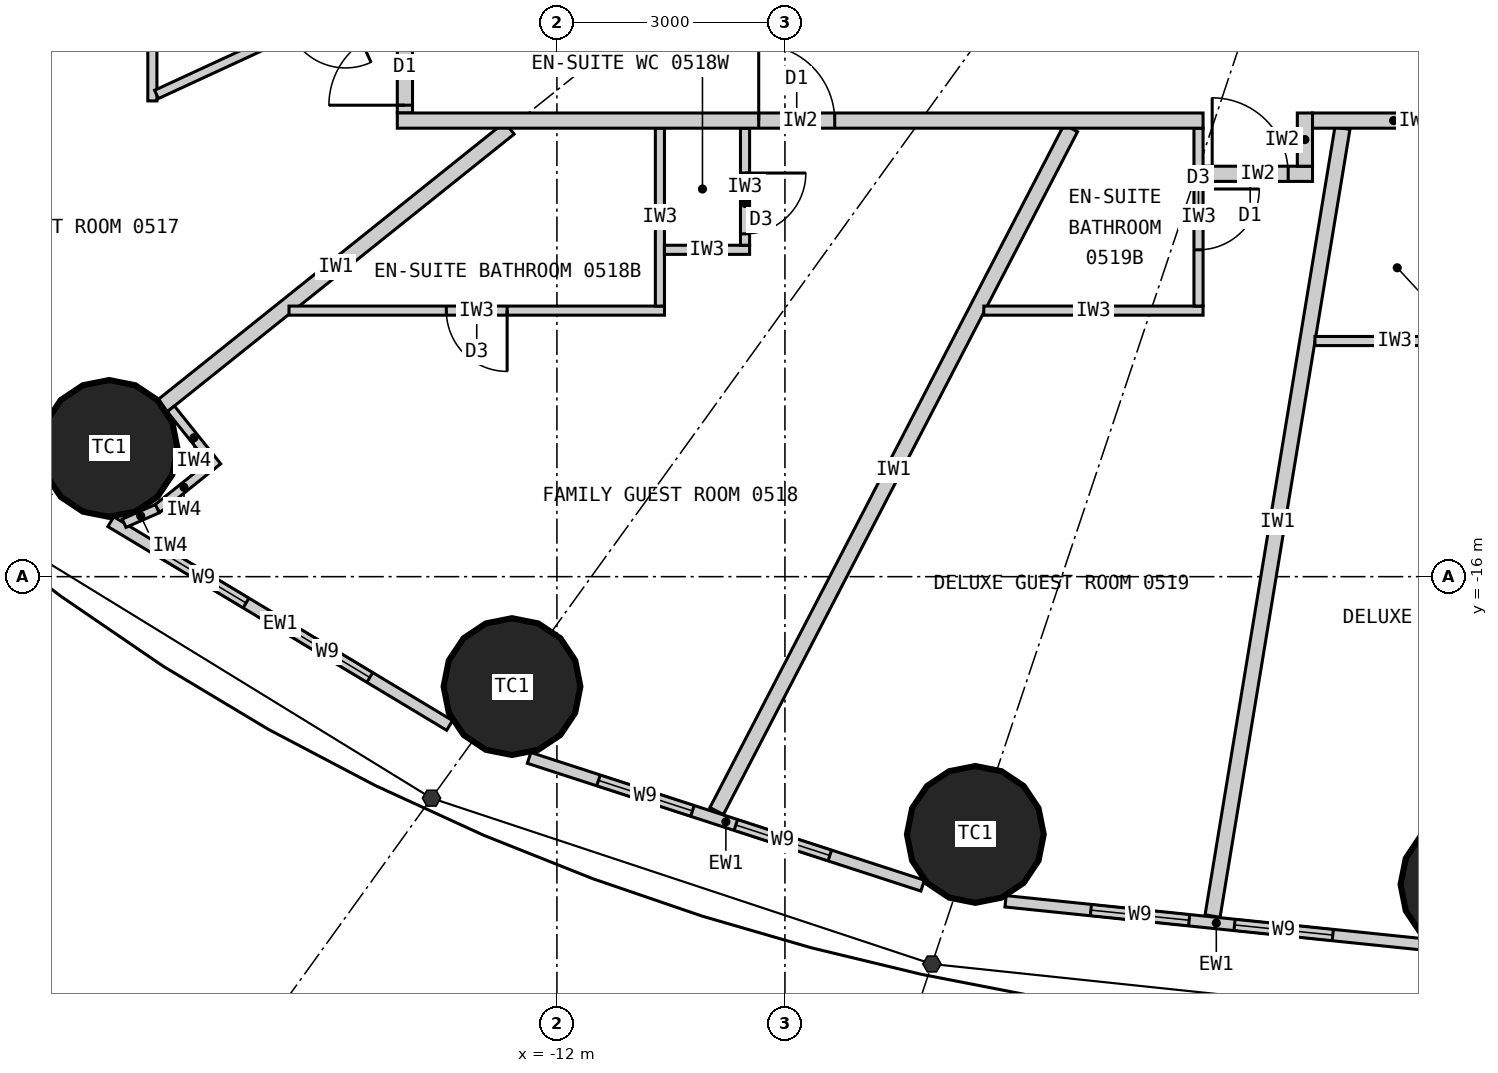
"""IFC4 building model, lengths in metres.
Left out: names, types, materials, properties, quantities, classifications, styles, units other than length and angle.
Written with IfcOpenShell. Run it as: python <this file> out.ifc"""

import sys

from ifc_helpers import new_model, si_unit, direction, frame, frame_2d, origin, origin_2d, place, context, subcontext, project, spatial, rectangle, circle, extrude, element, fill, save


model = new_model("IFC4")
c1 = context("Model", 3, precision=1e-05, world=origin(), true_north=direction((0.0, 1.0)))
c2 = subcontext(c1, "Body", "Model", "MODEL_VIEW")
j1 = project(units=[si_unit("LENGTHUNIT", "METRE"), si_unit("PLANEANGLEUNIT", "RADIAN")], contexts=[c1])
p1 = place(None, origin())
s1 = spatial("IfcSite", under=j1, at=p1, CompositionType="ELEMENT")
p2 = place(p1, origin())
s2 = spatial("IfcBuilding", under=s1, at=p2, CompositionType="ELEMENT")
p3 = place(p2, frame((0.0, 0.0, 29.4)))
s3 = spatial("IfcBuildingStorey", under=s2, at=p3, CompositionType="ELEMENT", Elevation=29.4)
for number, where, z_axis, x_axis in (
    (1, (-17.892, -14.313, 0.0), (0.0, 0.0, 1.0), (1.0, 0.0, 0.0)),
    (2, (-12.591, -17.447, 0.0), (0.0, 0.0, 1.0), (1.0, 0.0, 0.0)),
    (3, (-6.495, -19.391, 0.0), (0.0, 0.0, 1.0), (1.0, 0.0, 0.0)),
    (4, (0.0, -20.05, 0.0), (0.0, 0.0, 1.0), (1.0, 0.0, 0.0)),
):
    element("IfcColumn", number, at=place(p3, frame(where, z_axis=z_axis, x_axis=x_axis)), inside=s3, PredefinedType="COLUMN", context=c2, shape_type="SweptSolid", body=[
        extrude(circle(Radius=0.9, at=origin_2d()), origin(), (0.0, 0.0, 1.0), 3.3),
    ])
p4 = place(p3, frame((-17.869, -15.277, 0.0), z_axis=(0.0, 0.0, 1.0), x_axis=(0.856958191554, -0.515385931054, 0.0)))
e5 = element("IfcWall", 5, at=p4, inside=s3, PredefinedType="ELEMENTEDWALL", context=c2, shape_type="SweptSolid", body=[
    extrude(rectangle(XDim=5.201, YDim=0.15, at=frame_2d((2.601, 0.0))), origin(), (0.0, 0.0, 1.0), 3.12),
])
p5 = place(p4, frame((0.776, 0.0, 0.9)))
e6 = element("IfcOpeningElement", 6, at=p5, cuts=e5, PredefinedType="OPENING", context=c2, shape_type="SweptSolid", body=[
    extrude(rectangle(XDim=1.3, YDim=1.9, at=frame_2d((0.65, 0.95))), frame((0.0, 0.085, 0.0), z_axis=(0.0, -1.0, 0.0), x_axis=(1.0, 0.0, 0.0)), (0.0, 0.0, 1.0), 0.17),
])
p6 = place(p4, frame((2.676, 0.0, 0.9)))
e7 = element("IfcOpeningElement", 7, at=p6, cuts=e5, PredefinedType="OPENING", context=c2, shape_type="SweptSolid", body=[
    extrude(rectangle(XDim=1.3, YDim=1.9, at=frame_2d((0.65, 0.95))), frame((0.0, 0.085, 0.0), z_axis=(0.0, -1.0, 0.0), x_axis=(1.0, 0.0, 0.0)), (0.0, 0.0, 1.0), 0.17),
])
p7 = place(p3, frame((-12.366, -18.384, 0.0), z_axis=(0.0, 0.0, 1.0), x_axis=(0.951138486029, -0.308764603532, 0.0)))
e8 = element("IfcWall", 8, at=p7, inside=s3, PredefinedType="ELEMENTEDWALL", context=c2, shape_type="SweptSolid", body=[
    extrude(rectangle(XDim=5.444, YDim=0.15, at=frame_2d((2.722, 0.0))), origin(), (0.0, 0.0, 1.0), 3.12),
])
p8 = place(p7, frame((0.96, 0.0, 0.9)))
e9 = element("IfcOpeningElement", 9, at=p8, cuts=e8, PredefinedType="OPENING", context=c2, shape_type="SweptSolid", body=[
    extrude(rectangle(XDim=1.3, YDim=1.9, at=frame_2d((0.65, 0.95))), frame((0.0, 0.085, 0.0), z_axis=(0.0, -1.0, 0.0), x_axis=(1.0, 0.0, 0.0)), (0.0, 0.0, 1.0), 0.17),
])
p9 = place(p7, frame((2.86, 0.0, 0.9)))
e10 = element("IfcOpeningElement", 10, at=p9, cuts=e8, PredefinedType="OPENING", context=c2, shape_type="SweptSolid", body=[
    extrude(rectangle(XDim=1.3, YDim=1.9, at=frame_2d((0.65, 0.95))), frame((0.0, 0.085, 0.0), z_axis=(0.0, -1.0, 0.0), x_axis=(1.0, 0.0, 0.0)), (0.0, 0.0, 1.0), 0.17),
])
p10 = place(p3, frame((-6.098, -20.271, 0.0), z_axis=(0.0, 0.0, 1.0), x_axis=(0.994723735084, -0.102589915983, 0.0)))
e11 = element("IfcWall", 11, at=p10, inside=s3, PredefinedType="ELEMENTEDWALL", context=c2, shape_type="SweptSolid", body=[
    extrude(rectangle(XDim=5.576, YDim=0.15, at=frame_2d((2.788, 0.0))), origin(), (0.0, 0.0, 1.0), 3.12),
])
p11 = place(p10, frame((1.129, 0.0, 0.9)))
e12 = element("IfcOpeningElement", 12, at=p11, cuts=e11, PredefinedType="OPENING", context=c2, shape_type="SweptSolid", body=[
    extrude(rectangle(XDim=1.3, YDim=1.9, at=frame_2d((0.65, 0.95))), frame((0.0, 0.085, 0.0), z_axis=(0.0, -1.0, 0.0), x_axis=(1.0, 0.0, 0.0)), (0.0, 0.0, 1.0), 0.17),
])
p12 = place(p10, frame((3.029, 0.0, 0.9)))
e13 = element("IfcOpeningElement", 13, at=p12, cuts=e11, PredefinedType="OPENING", context=c2, shape_type="SweptSolid", body=[
    extrude(rectangle(XDim=1.3, YDim=1.9, at=frame_2d((0.65, 0.95))), frame((0.0, 0.085, 0.0), z_axis=(0.0, -1.0, 0.0), x_axis=(1.0, 0.0, 0.0)), (0.0, 0.0, 1.0), 0.17),
])
p13 = place(p3, frame((-14.1, -6.512, 0.0), z_axis=(0.0, 0.0, 1.0), x_axis=(-0.907842433118, -0.41931147925, 0.0)))
e14 = element("IfcWall", 14, at=p13, inside=s3, PredefinedType="PARTITIONING", context=c2, shape_type="SweptSolid", body=[
    extrude(rectangle(XDim=7.823, YDim=0.2, at=frame_2d((3.912, 0.0))), origin(), (0.0, 0.0, 1.0), 2.32),
])
p14 = place(p3, frame((-12.625, -10.1, 0.0), z_axis=(0.0, 0.0, 1.0), x_axis=(-0.780872884676, -0.624689953479, 0.0)))
e15 = element("IfcWall", 15, at=p14, inside=s3, PredefinedType="PARTITIONING", context=c2, shape_type="SweptSolid", body=[
    extrude(rectangle(XDim=5.845, YDim=0.2, at=frame_2d((2.922, 0.0))), origin(), (0.0, 0.0, 1.0), 2.32),
])
p15 = place(p3, frame((-5.239, -10.1, 0.0), z_axis=(0.0, 0.0, 1.0), x_axis=(-0.460422783389, -0.887699758103, 0.0)))
e16 = element("IfcWall", 16, at=p15, inside=s3, PredefinedType="PARTITIONING", context=c2, shape_type="SweptSolid", body=[
    extrude(rectangle(XDim=10.12, YDim=0.2, at=frame_2d((5.06, 0.0))), origin(), (0.0, 0.0, 1.0), 3.12),
])
p16 = place(p3, frame((-1.665, -10.1, 0.0), z_axis=(0.0, 0.0, 1.0), x_axis=(-0.162657606458, -0.986682574621, 0.0)))
e17 = element("IfcWall", 17, at=p16, inside=s3, PredefinedType="PARTITIONING", context=c2, shape_type="SweptSolid", body=[
    extrude(rectangle(XDim=10.505, YDim=0.2, at=frame_2d((5.252, 0.0))), origin(), (0.0, 0.0, 1.0), 3.12),
])
p17 = place(p3, frame((-17.323, -8.101, 0.0), z_axis=(0.0, 0.0, 1.0), x_axis=(0.0, -1.0, 0.0)))
e18 = element("IfcWall", 18, at=p17, inside=s3, PredefinedType="PARTITIONING", context=c2, shape_type="SweptSolid", body=[
    extrude(rectangle(XDim=1.64, YDim=0.12, at=frame_2d((0.82, 0.0))), origin(), (0.0, 0.0, 1.0), 3.12),
])
p18 = place(p3, frame((-14.1, -8.193, 0.0), z_axis=(0.0, 0.0, 1.0), x_axis=(-0.907836493557, -0.419324338628, 0.0)))
e19 = element("IfcWall", 19, at=p18, inside=s3, PredefinedType="PARTITIONING", context=c2, shape_type="SweptSolid", body=[
    extrude(rectangle(XDim=3.49, YDim=0.12, at=frame_2d((1.745, 0.0))), origin(), (0.0, 0.0, 1.0), 3.12),
])
p19 = place(p18, frame((0.75, 0.0, 0.0)))
e20 = element("IfcOpeningElement", 20, at=p19, cuts=e19, PredefinedType="OPENING", context=c2, shape_type="SweptSolid", body=[
    extrude(rectangle(XDim=0.8, YDim=2.1, at=frame_2d((0.4, 1.05))), frame((0.0, 0.07, 0.0), z_axis=(0.0, -1.0, 0.0), x_axis=(1.0, 0.0, 0.0)), (0.0, 0.0, 1.0), 0.14),
])
p20 = place(p3, frame((-15.525, -12.5, 0.0), z_axis=(0.0, 0.0, 1.0), x_axis=(1.0, 0.0, 0.0)))
e21 = element("IfcWall", 21, at=p20, inside=s3, PredefinedType="PARTITIONING", context=c2, shape_type="SweptSolid", body=[
    extrude(rectangle(XDim=4.94, YDim=0.12, at=frame_2d((2.47, 0.0))), origin(), (0.0, 0.0, 1.0), 3.12),
])
p21 = place(p20, frame((2.07, 0.0, 0.0)))
e22 = element("IfcOpeningElement", 22, at=p21, cuts=e21, PredefinedType="OPENING", context=c2, shape_type="SweptSolid", body=[
    extrude(rectangle(XDim=0.8, YDim=2.1, at=frame_2d((0.4, 1.05))), frame((0.0, 0.07, 0.0), z_axis=(0.0, -1.0, 0.0), x_axis=(1.0, 0.0, 0.0)), (0.0, 0.0, 1.0), 0.14),
])
p22 = place(p3, frame((-10.645, -10.1, 0.0), z_axis=(0.0, 0.0, 1.0), x_axis=(0.0, -1.0, 0.0)))
e23 = element("IfcWall", 23, at=p22, inside=s3, PredefinedType="PARTITIONING", context=c2, shape_type="SweptSolid", body=[
    extrude(rectangle(XDim=2.34, YDim=0.12, at=frame_2d((1.17, 0.0))), origin(), (0.0, 0.0, 1.0), 3.12),
])
p23 = place(p3, frame((-10.585, -11.7, 0.0), z_axis=(0.0, 0.0, 1.0), x_axis=(1.0, 0.0, 0.0)))
e24 = element("IfcWall", 24, at=p23, inside=s3, PredefinedType="PARTITIONING", context=c2, shape_type="SweptSolid", body=[
    extrude(rectangle(XDim=1.12, YDim=0.12, at=frame_2d((0.56, 0.0))), origin(), (0.0, 0.0, 1.0), 3.12),
])
p24 = place(p3, frame((-9.525, -10.1, 0.0), z_axis=(0.0, 0.0, 1.0), x_axis=(0.0, -1.0, 0.0)))
e25 = element("IfcWall", 25, at=p24, inside=s3, PredefinedType="PARTITIONING", context=c2, shape_type="SweptSolid", body=[
    extrude(rectangle(XDim=1.54, YDim=0.12, at=frame_2d((0.77, 0.0))), origin(), (0.0, 0.0, 1.0), 3.12),
])
p25 = place(p24, frame((0.59, 0.0, 0.0)))
e26 = element("IfcOpeningElement", 26, at=p25, cuts=e25, PredefinedType="OPENING", context=c2, shape_type="SweptSolid", body=[
    extrude(rectangle(XDim=0.8, YDim=2.1, at=frame_2d((0.4, 1.05))), frame((0.0, 0.07, 0.0), z_axis=(0.0, -1.0, 0.0), x_axis=(1.0, 0.0, 0.0)), (0.0, 0.0, 1.0), 0.14),
])
p26 = place(p3, frame((-6.383, -12.5, 0.0), z_axis=(0.0, 0.0, 1.0), x_axis=(1.0, 0.0, 0.0)))
e27 = element("IfcWall", 27, at=p26, inside=s3, PredefinedType="PARTITIONING", context=c2, shape_type="SweptSolid", body=[
    extrude(rectangle(XDim=2.885, YDim=0.12, at=frame_2d((1.442, 0.0))), origin(), (0.0, 0.0, 1.0), 3.12),
])
p27 = place(p3, frame((-3.559, -10.1, 0.0), z_axis=(0.0, 0.0, 1.0), x_axis=(0.0, -1.0, 0.0)))
e28 = element("IfcWall", 28, at=p27, inside=s3, PredefinedType="PARTITIONING", context=c2, shape_type="SweptSolid", body=[
    extrude(rectangle(XDim=2.34, YDim=0.12, at=frame_2d((1.17, 0.0))), origin(), (0.0, 0.0, 1.0), 3.12),
])
p28 = place(p27, frame((0.8, 0.0, 0.0)))
e29 = element("IfcOpeningElement", 29, at=p28, cuts=e28, PredefinedType="OPENING", context=c2, shape_type="SweptSolid", body=[
    extrude(rectangle(XDim=0.8, YDim=2.1, at=frame_2d((0.4, 1.05))), frame((0.0, 0.07, 0.0), z_axis=(0.0, -1.0, 0.0), x_axis=(1.0, 0.0, 0.0)), (0.0, 0.0, 1.0), 0.14),
])
p29 = place(p3, frame((-2.027, -12.9, 0.0), z_axis=(0.0, 0.0, 1.0), x_axis=(1.0, 0.0, 0.0)))
e30 = element("IfcWall", 30, at=p29, inside=s3, PredefinedType="PARTITIONING", context=c2, shape_type="SweptSolid", body=[
    extrude(rectangle(XDim=2.102, YDim=0.12, at=frame_2d((1.051, 0.0))), origin(), (0.0, 0.0, 1.0), 3.12),
])
p30 = place(p3, frame((-2.059, -10.7, 0.0), z_axis=(0.0, 0.0, 1.0), x_axis=(-1.0, 0.0, 0.0)))
e31 = element("IfcWall", 31, at=p30, inside=s3, PredefinedType="PARTITIONING", context=c2, shape_type="SweptSolid", body=[
    extrude(rectangle(XDim=1.44, YDim=0.2, at=frame_2d((0.72, 0.0))), origin(), (0.0, 0.0, 1.0), 3.12),
])
p31 = place(p30, frame((0.32, 0.0, 0.0)))
e32 = element("IfcOpeningElement", 32, at=p31, cuts=e31, PredefinedType="OPENING", context=c2, shape_type="SweptSolid", body=[
    extrude(rectangle(XDim=1.0, YDim=2.2, at=frame_2d((0.5, 1.1))), frame((0.0, 0.11, 0.0), z_axis=(0.0, -1.0, 0.0), x_axis=(1.0, 0.0, 0.0)), (0.0, 0.0, 1.0), 0.22),
])
p32 = place(p3, frame((-2.159, -9.9, 0.0), z_axis=(0.0, 0.0, 1.0), x_axis=(0.0, -1.0, 0.0)))
e33 = element("IfcWall", 33, at=p32, inside=s3, PredefinedType="PARTITIONING", context=c2, shape_type="SweptSolid", body=[
    extrude(rectangle(XDim=0.7, YDim=0.2, at=frame_2d((0.35, 0.0))), origin(), (0.0, 0.0, 1.0), 3.12),
])
p33 = place(p3, frame((-14.0, -4.772, 0.0), z_axis=(0.0, 0.0, 1.0), x_axis=(0.0, -1.0, 0.0)))
e34 = element("IfcWall", 34, at=p33, inside=s3, PredefinedType="PARTITIONING", context=c2, shape_type="SweptSolid", body=[
    extrude(rectangle(XDim=5.127, YDim=0.2, at=frame_2d((2.564, 0.0))), origin(), (0.0, 0.0, 1.0), 3.12),
])
p34 = place(p33, frame((4.025, 0.0, 0.0)))
e35 = element("IfcOpeningElement", 35, at=p34, cuts=e34, PredefinedType="OPENING", context=c2, shape_type="SweptSolid", body=[
    extrude(rectangle(XDim=1.0, YDim=2.2, at=frame_2d((0.5, 1.1))), frame((0.0, 0.11, 0.0), z_axis=(0.0, -1.0, 0.0), x_axis=(1.0, 0.0, 0.0)), (0.0, 0.0, 1.0), 0.22),
])
p35 = place(p3, frame((0.075, -10.0, 0.0), z_axis=(0.0, 0.0, 1.0), x_axis=(-1.0, 0.0, 0.0)))
e36 = element("IfcWall", 36, at=p35, inside=s3, PredefinedType="PARTITIONING", context=c2, shape_type="SweptSolid", body=[
    extrude(rectangle(XDim=2.134, YDim=0.2, at=frame_2d((1.067, 0.0))), origin(), (0.0, 0.0, 1.0), 3.12),
])
p36 = place(p3, frame((-3.499, -10.0, 0.0), z_axis=(0.0, 0.0, 1.0), x_axis=(-1.0, 0.0, 0.0)))
e37 = element("IfcWall", 37, at=p36, inside=s3, PredefinedType="PARTITIONING", context=c2, shape_type="SweptSolid", body=[
    extrude(rectangle(XDim=10.602, YDim=0.2, at=frame_2d((5.301, 0.0))), origin(), (0.0, 0.0, 1.0), 3.12),
])
p37 = place(p36, frame((4.846, 0.0, 0.0)))
e38 = element("IfcOpeningElement", 38, at=p37, cuts=e37, PredefinedType="OPENING", context=c2, shape_type="SweptSolid", body=[
    extrude(rectangle(XDim=1.0, YDim=2.2, at=frame_2d((0.5, 1.1))), frame((0.0, 0.11, 0.0), z_axis=(0.0, -1.0, 0.0), x_axis=(1.0, 0.0, 0.0)), (0.0, 0.0, 1.0), 0.22),
])
p38 = place(p3, frame((-17.08, -13.792, 0.0), z_axis=(0.0, 0.0, 1.0), x_axis=(0.624756144097, -0.780819928289, 0.0)))
e39 = element("IfcWall", 39, at=p38, inside=s3, PredefinedType="PARTITIONING", context=c2, shape_type="SweptSolid", body=[
    extrude(rectangle(XDim=0.975, YDim=0.12, at=frame_2d((0.487, 0.0))), origin(), (0.0, 0.0, 1.0), 3.12),
])
p39 = place(p3, frame((-16.555, -14.543, 0.0), z_axis=(0.0, 0.0, 1.0), x_axis=(-0.780789399477, -0.62479429708, 0.0)))
e40 = element("IfcWall", 40, at=p39, inside=s3, PredefinedType="PARTITIONING", context=c2, shape_type="SweptSolid", body=[
    extrude(rectangle(XDim=0.9, YDim=0.12, at=frame_2d((0.45, 0.0))), origin(), (0.0, 0.0, 1.0), 3.12),
])
p40 = place(p3, frame((-17.258, -15.106, 0.0), z_axis=(0.0, 0.0, 1.0), x_axis=(-0.916098562583, -0.400953143937, 0.0)))
e41 = element("IfcWall", 41, at=p40, inside=s3, PredefinedType="PARTITIONING", context=c2, shape_type="SweptSolid", body=[
    extrude(rectangle(XDim=0.477, YDim=0.12, at=frame_2d((0.238, 0.0))), origin(), (0.0, 0.0, 1.0), 3.12),
])
p41 = place(p5, origin())
e42 = element("IfcWindow", 42, at=p41, inside=s3, PartitioningType="SINGLE_PANEL", PredefinedType="WINDOW", context=c2, shape_type="SweptSolid", body=[
    extrude(rectangle(XDim=1.3, YDim=1.9, at=frame_2d((0.65, 0.95))), frame((0.0, 0.03, 0.0), z_axis=(0.0, -1.0, 0.0), x_axis=(1.0, 0.0, 0.0)), (0.0, 0.0, 1.0), 0.06),
])
fill(e6, e42)
p42 = place(p6, origin())
e43 = element("IfcWindow", 43, at=p42, inside=s3, PartitioningType="SINGLE_PANEL", PredefinedType="WINDOW", context=c2, shape_type="SweptSolid", body=[
    extrude(rectangle(XDim=1.3, YDim=1.9, at=frame_2d((0.65, 0.95))), frame((0.0, 0.03, 0.0), z_axis=(0.0, -1.0, 0.0), x_axis=(1.0, 0.0, 0.0)), (0.0, 0.0, 1.0), 0.06),
])
fill(e7, e43)
p43 = place(p8, origin())
e44 = element("IfcWindow", 44, at=p43, inside=s3, PartitioningType="SINGLE_PANEL", PredefinedType="WINDOW", context=c2, shape_type="SweptSolid", body=[
    extrude(rectangle(XDim=1.3, YDim=1.9, at=frame_2d((0.65, 0.95))), frame((0.0, 0.03, 0.0), z_axis=(0.0, -1.0, 0.0), x_axis=(1.0, 0.0, 0.0)), (0.0, 0.0, 1.0), 0.06),
])
fill(e9, e44)
p44 = place(p9, origin())
e45 = element("IfcWindow", 45, at=p44, inside=s3, PartitioningType="SINGLE_PANEL", PredefinedType="WINDOW", context=c2, shape_type="SweptSolid", body=[
    extrude(rectangle(XDim=1.3, YDim=1.9, at=frame_2d((0.65, 0.95))), frame((0.0, 0.03, 0.0), z_axis=(0.0, -1.0, 0.0), x_axis=(1.0, 0.0, 0.0)), (0.0, 0.0, 1.0), 0.06),
])
fill(e10, e45)
p45 = place(p11, origin())
e46 = element("IfcWindow", 46, at=p45, inside=s3, PartitioningType="SINGLE_PANEL", PredefinedType="WINDOW", context=c2, shape_type="SweptSolid", body=[
    extrude(rectangle(XDim=1.3, YDim=1.9, at=frame_2d((0.65, 0.95))), frame((0.0, 0.03, 0.0), z_axis=(0.0, -1.0, 0.0), x_axis=(1.0, 0.0, 0.0)), (0.0, 0.0, 1.0), 0.06),
])
fill(e12, e46)
p46 = place(p12, origin())
e47 = element("IfcWindow", 47, at=p46, inside=s3, PartitioningType="SINGLE_PANEL", PredefinedType="WINDOW", context=c2, shape_type="SweptSolid", body=[
    extrude(rectangle(XDim=1.3, YDim=1.9, at=frame_2d((0.65, 0.95))), frame((0.0, 0.03, 0.0), z_axis=(0.0, -1.0, 0.0), x_axis=(1.0, 0.0, 0.0)), (0.0, 0.0, 1.0), 0.06),
])
fill(e13, e47)
p47 = place(p34, origin())
e48 = element("IfcDoor", 48, at=p47, inside=s3, OperationType="SINGLE_SWING_RIGHT", PredefinedType="DOOR", context=c2, shape_type="SweptSolid", body=[
    extrude(rectangle(XDim=1.0, YDim=2.2, at=frame_2d((0.5, 1.1))), frame((0.0, 0.025, 0.0), z_axis=(0.0, -1.0, 0.0), x_axis=(1.0, 0.0, 0.0)), (0.0, 0.0, 1.0), 0.05),
])
fill(e35, e48)
p48 = place(p21, origin())
e49 = element("IfcDoor", 49, at=p48, inside=s3, OperationType="SINGLE_SWING_RIGHT", PredefinedType="DOOR", context=c2, shape_type="SweptSolid", body=[
    extrude(rectangle(XDim=0.8, YDim=2.1, at=frame_2d((0.4, 1.05))), frame((0.0, 0.025, 0.0), z_axis=(0.0, -1.0, 0.0), x_axis=(1.0, 0.0, 0.0)), (0.0, 0.0, 1.0), 0.05),
])
fill(e22, e49)
p49 = place(p25, origin())
e50 = element("IfcDoor", 50, at=p49, inside=s3, OperationType="SINGLE_SWING_LEFT", PredefinedType="DOOR", context=c2, shape_type="SweptSolid", body=[
    extrude(rectangle(XDim=0.8, YDim=2.1, at=frame_2d((0.4, 1.05))), frame((0.0, 0.025, 0.0), z_axis=(0.0, -1.0, 0.0), x_axis=(1.0, 0.0, 0.0)), (0.0, 0.0, 1.0), 0.05),
])
fill(e26, e50)
p50 = place(p37, origin())
e51 = element("IfcDoor", 51, at=p50, inside=s3, OperationType="SINGLE_SWING_RIGHT", PredefinedType="DOOR", context=c2, shape_type="SweptSolid", body=[
    extrude(rectangle(XDim=1.0, YDim=2.2, at=frame_2d((0.5, 1.1))), frame((0.0, 0.025, 0.0), z_axis=(0.0, -1.0, 0.0), x_axis=(1.0, 0.0, 0.0)), (0.0, 0.0, 1.0), 0.05),
])
fill(e38, e51)
p51 = place(p28, origin())
e52 = element("IfcDoor", 52, at=p51, inside=s3, OperationType="SINGLE_SWING_LEFT", PredefinedType="DOOR", context=c2, shape_type="SweptSolid", body=[
    extrude(rectangle(XDim=0.8, YDim=2.1, at=frame_2d((0.4, 1.05))), frame((0.0, 0.025, 0.0), z_axis=(0.0, -1.0, 0.0), x_axis=(1.0, 0.0, 0.0)), (0.0, 0.0, 1.0), 0.05),
])
fill(e29, e52)
p52 = place(p31, origin())
e53 = element("IfcDoor", 53, at=p52, inside=s3, OperationType="SINGLE_SWING_RIGHT", PredefinedType="DOOR", context=c2, shape_type="SweptSolid", body=[
    extrude(rectangle(XDim=1.0, YDim=2.2, at=frame_2d((0.5, 1.1))), frame((0.0, 0.025, 0.0), z_axis=(0.0, -1.0, 0.0), x_axis=(1.0, 0.0, 0.0)), (0.0, 0.0, 1.0), 0.05),
])
fill(e32, e53)
save(model, sys.argv[1])
